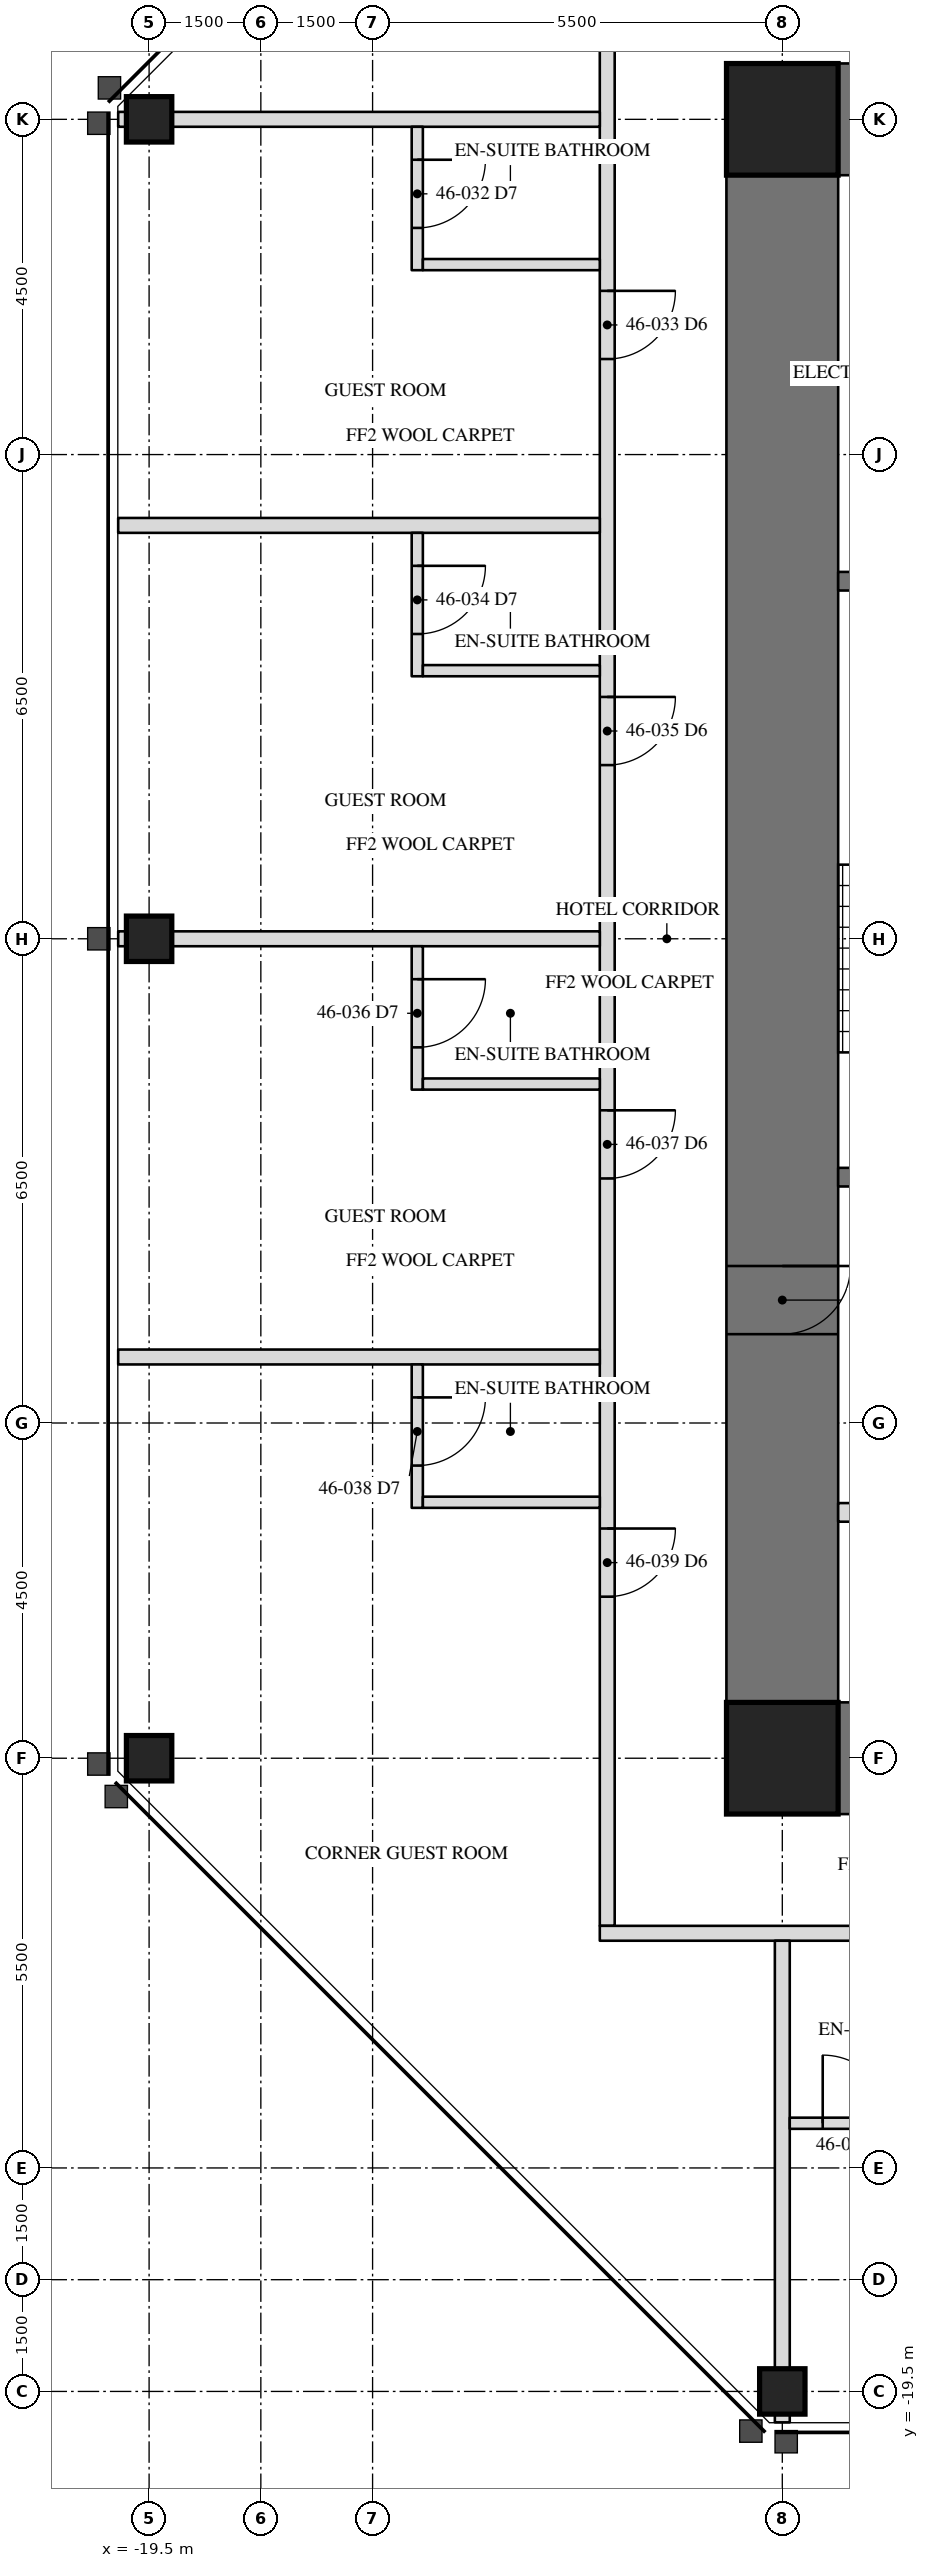
"""IFC4 building model, lengths in metres.
Left out: names, types, materials, properties, quantities, classifications, styles, units other than length and angle.
Written with IfcOpenShell. Run it as: python <this file> out.ifc"""

import sys

from ifc_helpers import new_model, si_unit, direction, frame, frame_2d, origin, origin_2d, place, context, subcontext, project, spatial, rectangle, hollow_rectangle, extrude, element, fill, save


model = new_model("IFC4")
c1 = context("Model", 3, precision=1e-05, world=origin(), true_north=direction((0.0, 1.0)))
c2 = subcontext(c1, "Body", "Model", "MODEL_VIEW")
j1 = project(units=[si_unit("LENGTHUNIT", "METRE"), si_unit("PLANEANGLEUNIT", "RADIAN")], contexts=[c1])
p1 = place(None, origin())
s1 = spatial("IfcSite", under=j1, at=p1, CompositionType="ELEMENT")
p2 = place(p1, origin())
s2 = spatial("IfcBuilding", under=s1, at=p2, CompositionType="ELEMENT")
p3 = place(p2, frame((0.0, 0.0, 197.7)))
s3 = spatial("IfcBuildingStorey", under=s2, at=p3, CompositionType="ELEMENT", Elevation=197.7)
for number, where, z_axis, x_axis in (
    (1, (-19.5, 0.0, 0.0), (0.0, 0.0, 1.0), (0.0, 1.0, 0.0)),
    (2, (-19.5, -11.0, 0.0), (0.0, 0.0, 1.0), (0.0, 1.0, 0.0)),
    (3, (-11.0, -19.5, 0.0), (0.0, 0.0, 1.0), (1.0, 0.0, 0.0)),
    (4, (-19.5, 11.0, 0.0), (0.0, 0.0, 1.0), (0.0, 1.0, 0.0)),
):
    element("IfcColumn", number, at=place(p3, frame(where, z_axis=z_axis, x_axis=x_axis)), inside=s3, PredefinedType="COLUMN", context=c2, shape_type="SweptSolid", body=[
        extrude(hollow_rectangle(XDim=0.61, YDim=0.61, WallThickness=0.076, at=origin_2d()), origin(), (0.0, 0.0, 1.0), 3.5),
    ])
p4 = place(p3, frame((-11.0, 11.0, 0.0), z_axis=(0.0, 0.0, 1.0), x_axis=(0.0, -1.0, 0.0)))
e5 = element("IfcWall", 5, at=p4, inside=s3, PredefinedType="SHEAR", context=c2, shape_type="SweptSolid", body=[
    extrude(rectangle(XDim=22.0, YDim=1.5, at=frame_2d((11.0, 0.0))), origin(), (0.0, 0.0, 1.0), 3.5),
])
p5 = place(p4, frame((15.393, 0.0, 0.0)))
e6 = element("IfcOpeningElement", 6, at=p5, cuts=e5, PredefinedType="OPENING", context=c2, shape_type="SweptSolid", body=[
    extrude(rectangle(XDim=0.915, YDim=2.134, at=frame_2d((0.458, 1.067))), frame((0.0, 0.76, 0.0), z_axis=(0.0, -1.0, 0.0), x_axis=(1.0, 0.0, 0.0)), (0.0, 0.0, 1.0), 1.52),
])
for number, where, z_axis, x_axis in (
    (7, (-6.5, 11.0, 0.0), (0.0, 0.0, 1.0), (-1.0, 0.0, 0.0)),
    (8, (-11.0, -11.0, 0.0), (0.0, 0.0, 1.0), (1.0, 0.0, 0.0)),
):
    element("IfcWall", number, at=place(p3, frame(where, z_axis=z_axis, x_axis=x_axis)), inside=s3, PredefinedType="SHEAR", context=c2, shape_type="SweptSolid", body=[
        extrude(rectangle(XDim=4.5, YDim=1.5, at=frame_2d((2.25, 0.0))), origin(), (0.0, 0.0, 1.0), 3.5),
    ])
for number, where, z_axis, x_axis in (
    (9, (-11.0, 11.0, 0.0), (0.0, 0.0, 1.0), (1.0, 0.0, 0.0)),
    (10, (-11.0, -11.0, 0.0), (0.0, 0.0, 1.0), (1.0, 0.0, 0.0)),
):
    element("IfcColumn", number, at=place(p3, frame(where, z_axis=z_axis, x_axis=x_axis)), inside=s3, PredefinedType="COLUMN", context=c2, shape_type="SweptSolid", body=[
        extrude(hollow_rectangle(XDim=1.499, YDim=1.499, WallThickness=0.102, at=origin_2d()), origin(), (0.0, 0.0, 1.0), 3.5),
    ])
p6 = place(p3, frame((-6.95, 4.8, 0.0), z_axis=(0.0, 0.0, 1.0), x_axis=(-1.0, 0.0, 0.0)))
e11 = element("IfcWall", 11, at=p6, inside=s3, PredefinedType="SOLIDWALL", context=c2, shape_type="SweptSolid", body=[
    extrude(rectangle(XDim=3.3, YDim=0.25, at=frame_2d((1.65, 0.0))), origin(), (0.0, 0.0, 1.0), 3.31),
])
p7 = place(p3, frame((-6.95, -3.2, 0.0), z_axis=(0.0, 0.0, 1.0), x_axis=(-1.0, 0.0, 0.0)))
e12 = element("IfcWall", 12, at=p7, inside=s3, PredefinedType="SOLIDWALL", context=c2, shape_type="SweptSolid", body=[
    extrude(rectangle(XDim=3.3, YDim=0.25, at=frame_2d((1.65, 0.0))), origin(), (0.0, 0.0, 1.0), 3.31),
])
p8 = place(p7, frame((1.116, 0.0, 0.0)))
e13 = element("IfcOpeningElement", 13, at=p8, cuts=e12, PredefinedType="OPENING", context=c2, shape_type="SweptSolid", body=[
    extrude(rectangle(XDim=1.067, YDim=2.134, at=frame_2d((0.533, 1.067))), frame((0.0, 0.135, 0.0), z_axis=(0.0, -1.0, 0.0), x_axis=(1.0, 0.0, 0.0)), (0.0, 0.0, 1.0), 0.27),
])
p9 = place(p3, frame((-6.95, -7.7, 0.0), z_axis=(0.0, 0.0, 1.0), x_axis=(-1.0, 0.0, 0.0)))
e14 = element("IfcWall", 14, at=p9, inside=s3, PredefinedType="PARTITIONING", context=c2, shape_type="SweptSolid", body=[
    extrude(rectangle(XDim=3.3, YDim=0.25, at=frame_2d((1.65, 0.0))), origin(), (0.0, 0.0, 1.0), 3.31),
])
p10 = place(p9, frame((0.45, 0.0, 0.0)))
e15 = element("IfcOpeningElement", 15, at=p10, cuts=e14, PredefinedType="OPENING", context=c2, shape_type="SweptSolid", body=[
    extrude(rectangle(XDim=1.219, YDim=2.134, at=frame_2d((0.609, 1.067))), frame((0.0, 0.135, 0.0), z_axis=(0.0, -1.0, 0.0), x_axis=(1.0, 0.0, 0.0)), (0.0, 0.0, 1.0), 0.27),
])
p11 = place(p3, frame((-13.35, 13.45, 0.0), z_axis=(0.0, 0.0, 1.0), x_axis=(0.0, -1.0, 0.0)))
e16 = element("IfcWall", 16, at=p11, inside=s3, PredefinedType="PARTITIONING", context=c2, shape_type="SweptSolid", body=[
    extrude(rectangle(XDim=26.7, YDim=0.2, at=frame_2d((13.35, 0.0))), origin(), (0.0, 0.0, 1.0), 3.31),
])
p12 = place(p11, frame((4.752, 0.0, 0.0)))
e17 = element("IfcOpeningElement", 17, at=p12, cuts=e16, PredefinedType="OPENING", context=c2, shape_type="SweptSolid", body=[
    extrude(rectangle(XDim=0.915, YDim=2.134, at=frame_2d((0.458, 1.067))), frame((0.0, 0.11, 0.0), z_axis=(0.0, -1.0, 0.0), x_axis=(1.0, 0.0, 0.0)), (0.0, 0.0, 1.0), 0.22),
])
p13 = place(p11, frame((10.204, 0.0, 0.0)))
e18 = element("IfcOpeningElement", 18, at=p13, cuts=e16, PredefinedType="OPENING", context=c2, shape_type="SweptSolid", body=[
    extrude(rectangle(XDim=0.915, YDim=2.134, at=frame_2d((0.458, 1.067))), frame((0.0, 0.11, 0.0), z_axis=(0.0, -1.0, 0.0), x_axis=(1.0, 0.0, 0.0)), (0.0, 0.0, 1.0), 0.22),
])
p14 = place(p11, frame((15.752, 0.0, 0.0)))
e19 = element("IfcOpeningElement", 19, at=p14, cuts=e16, PredefinedType="OPENING", context=c2, shape_type="SweptSolid", body=[
    extrude(rectangle(XDim=0.915, YDim=2.134, at=frame_2d((0.458, 1.067))), frame((0.0, 0.11, 0.0), z_axis=(0.0, -1.0, 0.0), x_axis=(1.0, 0.0, 0.0)), (0.0, 0.0, 1.0), 0.22),
])
p15 = place(p11, frame((21.366, 0.0, 0.0)))
e20 = element("IfcOpeningElement", 20, at=p15, cuts=e16, PredefinedType="OPENING", context=c2, shape_type="SweptSolid", body=[
    extrude(rectangle(XDim=0.915, YDim=2.134, at=frame_2d((0.458, 1.067))), frame((0.0, 0.11, 0.0), z_axis=(0.0, -1.0, 0.0), x_axis=(1.0, 0.0, 0.0)), (0.0, 0.0, 1.0), 0.22),
])
p16 = place(p3, frame((-13.45, -13.35, 0.0), z_axis=(0.0, 0.0, 1.0), x_axis=(1.0, 0.0, 0.0)))
e21 = element("IfcWall", 21, at=p16, inside=s3, PredefinedType="PARTITIONING", context=c2, shape_type="SweptSolid", body=[
    extrude(rectangle(XDim=26.7, YDim=0.2, at=frame_2d((13.35, 0.0))), origin(), (0.0, 0.0, 1.0), 3.31),
])
p17 = place(p16, frame((4.752, 0.0, 0.0)))
e22 = element("IfcOpeningElement", 22, at=p17, cuts=e21, PredefinedType="OPENING", context=c2, shape_type="SweptSolid", body=[
    extrude(rectangle(XDim=0.915, YDim=2.134, at=frame_2d((0.458, 1.067))), frame((0.0, 0.11, 0.0), z_axis=(0.0, -1.0, 0.0), x_axis=(1.0, 0.0, 0.0)), (0.0, 0.0, 1.0), 0.22),
])
p18 = place(p16, frame((10.204, 0.0, 0.0)))
e23 = element("IfcOpeningElement", 23, at=p18, cuts=e21, PredefinedType="OPENING", context=c2, shape_type="SweptSolid", body=[
    extrude(rectangle(XDim=0.915, YDim=2.134, at=frame_2d((0.458, 1.067))), frame((0.0, 0.11, 0.0), z_axis=(0.0, -1.0, 0.0), x_axis=(1.0, 0.0, 0.0)), (0.0, 0.0, 1.0), 0.22),
])
p19 = place(p16, frame((15.752, 0.0, 0.0)))
e24 = element("IfcOpeningElement", 24, at=p19, cuts=e21, PredefinedType="OPENING", context=c2, shape_type="SweptSolid", body=[
    extrude(rectangle(XDim=0.915, YDim=2.134, at=frame_2d((0.458, 1.067))), frame((0.0, 0.11, 0.0), z_axis=(0.0, -1.0, 0.0), x_axis=(1.0, 0.0, 0.0)), (0.0, 0.0, 1.0), 0.22),
])
p20 = place(p16, frame((21.967, 0.0, 0.0)))
e25 = element("IfcOpeningElement", 25, at=p20, cuts=e21, PredefinedType="OPENING", context=c2, shape_type="SweptSolid", body=[
    extrude(rectangle(XDim=0.915, YDim=2.134, at=frame_2d((0.458, 1.067))), frame((0.0, 0.11, 0.0), z_axis=(0.0, -1.0, 0.0), x_axis=(1.0, 0.0, 0.0)), (0.0, 0.0, 1.0), 0.22),
])
p21 = place(p3, frame((-13.45, 11.0, 0.0), z_axis=(0.0, 0.0, 1.0), x_axis=(-1.0, 0.0, 0.0)))
e26 = element("IfcWall", 26, at=p21, inside=s3, PredefinedType="PARTITIONING", context=c2, shape_type="SweptSolid", body=[
    extrude(rectangle(XDim=6.465, YDim=0.2, at=frame_2d((3.232, 0.0))), origin(), (0.0, 0.0, 1.0), 2.802),
])
p22 = place(p3, frame((-13.45, 5.549, 0.0), z_axis=(0.0, 0.0, 1.0), x_axis=(-1.0, 0.0, 0.0)))
e27 = element("IfcWall", 27, at=p22, inside=s3, PredefinedType="PARTITIONING", context=c2, shape_type="SweptSolid", body=[
    extrude(rectangle(XDim=6.465, YDim=0.2, at=frame_2d((3.232, 0.0))), origin(), (0.0, 0.0, 1.0), 3.31),
])
p23 = place(p3, frame((-13.45, 0.0, 0.0), z_axis=(0.0, 0.0, 1.0), x_axis=(-1.0, 0.0, 0.0)))
e28 = element("IfcWall", 28, at=p23, inside=s3, PredefinedType="PARTITIONING", context=c2, shape_type="SweptSolid", body=[
    extrude(rectangle(XDim=6.465, YDim=0.2, at=frame_2d((3.232, 0.0))), origin(), (0.0, 0.0, 1.0), 2.802),
])
p24 = place(p3, frame((-13.45, -5.614, 0.0), z_axis=(0.0, 0.0, 1.0), x_axis=(-1.0, 0.0, 0.0)))
e29 = element("IfcWall", 29, at=p24, inside=s3, PredefinedType="PARTITIONING", context=c2, shape_type="SweptSolid", body=[
    extrude(rectangle(XDim=6.465, YDim=0.2, at=frame_2d((3.232, 0.0))), origin(), (0.0, 0.0, 1.0), 3.31),
])
p25 = place(p3, frame((-15.9, 10.9, 0.0), z_axis=(0.0, 0.0, 1.0), x_axis=(0.0, -1.0, 0.0)))
e30 = element("IfcWall", 30, at=p25, inside=s3, PredefinedType="PARTITIONING", context=c2, shape_type="SweptSolid", body=[
    extrude(rectangle(XDim=1.925, YDim=0.15, at=frame_2d((0.962, 0.0))), origin(), (0.0, 0.0, 1.0), 3.31),
])
p26 = place(p25, frame((0.442, 0.0, 0.0)))
e31 = element("IfcOpeningElement", 31, at=p26, cuts=e30, PredefinedType="OPENING", context=c2, shape_type="SweptSolid", body=[
    extrude(rectangle(XDim=0.915, YDim=2.032, at=frame_2d((0.458, 1.016))), frame((0.0, 0.085, 0.0), z_axis=(0.0, -1.0, 0.0), x_axis=(1.0, 0.0, 0.0)), (0.0, 0.0, 1.0), 0.17),
])
p27 = place(p3, frame((-13.45, 9.05, 0.0), z_axis=(0.0, 0.0, 1.0), x_axis=(-1.0, 0.0, 0.0)))
e32 = element("IfcWall", 32, at=p27, inside=s3, PredefinedType="PARTITIONING", context=c2, shape_type="SweptSolid", body=[
    extrude(rectangle(XDim=2.375, YDim=0.15, at=frame_2d((1.188, 0.0))), origin(), (0.0, 0.0, 1.0), 3.31),
])
p28 = place(p3, frame((-15.9, 5.449, 0.0), z_axis=(0.0, 0.0, 1.0), x_axis=(0.0, -1.0, 0.0)))
e33 = element("IfcWall", 33, at=p28, inside=s3, PredefinedType="PARTITIONING", context=c2, shape_type="SweptSolid", body=[
    extrude(rectangle(XDim=1.925, YDim=0.15, at=frame_2d((0.962, 0.0))), origin(), (0.0, 0.0, 1.0), 3.31),
])
p29 = place(p28, frame((0.442, 0.0, 0.0)))
e34 = element("IfcOpeningElement", 34, at=p29, cuts=e33, PredefinedType="OPENING", context=c2, shape_type="SweptSolid", body=[
    extrude(rectangle(XDim=0.915, YDim=2.032, at=frame_2d((0.458, 1.016))), frame((0.0, 0.085, 0.0), z_axis=(0.0, -1.0, 0.0), x_axis=(1.0, 0.0, 0.0)), (0.0, 0.0, 1.0), 0.17),
])
p30 = place(p3, frame((-13.45, 3.599, 0.0), z_axis=(0.0, 0.0, 1.0), x_axis=(-1.0, 0.0, 0.0)))
e35 = element("IfcWall", 35, at=p30, inside=s3, PredefinedType="PARTITIONING", context=c2, shape_type="SweptSolid", body=[
    extrude(rectangle(XDim=2.375, YDim=0.15, at=frame_2d((1.188, 0.0))), origin(), (0.0, 0.0, 1.0), 2.703),
])
p31 = place(p3, frame((-15.9, -0.1, 0.0), z_axis=(0.0, 0.0, 1.0), x_axis=(0.0, -1.0, 0.0)))
e36 = element("IfcWall", 36, at=p31, inside=s3, PredefinedType="PARTITIONING", context=c2, shape_type="SweptSolid", body=[
    extrude(rectangle(XDim=1.925, YDim=0.15, at=frame_2d((0.962, 0.0))), origin(), (0.0, 0.0, 1.0), 3.31),
])
p32 = place(p31, frame((0.442, 0.0, 0.0)))
e37 = element("IfcOpeningElement", 37, at=p32, cuts=e36, PredefinedType="OPENING", context=c2, shape_type="SweptSolid", body=[
    extrude(rectangle(XDim=0.915, YDim=2.032, at=frame_2d((0.458, 1.016))), frame((0.0, 0.085, 0.0), z_axis=(0.0, -1.0, 0.0), x_axis=(1.0, 0.0, 0.0)), (0.0, 0.0, 1.0), 0.17),
])
p33 = place(p3, frame((-13.45, -1.95, 0.0), z_axis=(0.0, 0.0, 1.0), x_axis=(-1.0, 0.0, 0.0)))
e38 = element("IfcWall", 38, at=p33, inside=s3, PredefinedType="PARTITIONING", context=c2, shape_type="SweptSolid", body=[
    extrude(rectangle(XDim=2.375, YDim=0.15, at=frame_2d((1.188, 0.0))), origin(), (0.0, 0.0, 1.0), 3.31),
])
p34 = place(p3, frame((-15.9, -5.714, 0.0), z_axis=(0.0, 0.0, 1.0), x_axis=(0.0, -1.0, 0.0)))
e39 = element("IfcWall", 39, at=p34, inside=s3, PredefinedType="PARTITIONING", context=c2, shape_type="SweptSolid", body=[
    extrude(rectangle(XDim=1.925, YDim=0.15, at=frame_2d((0.962, 0.0))), origin(), (0.0, 0.0, 1.0), 3.31),
])
p35 = place(p34, frame((0.442, 0.0, 0.0)))
e40 = element("IfcOpeningElement", 40, at=p35, cuts=e39, PredefinedType="OPENING", context=c2, shape_type="SweptSolid", body=[
    extrude(rectangle(XDim=0.915, YDim=2.032, at=frame_2d((0.458, 1.016))), frame((0.0, 0.085, 0.0), z_axis=(0.0, -1.0, 0.0), x_axis=(1.0, 0.0, 0.0)), (0.0, 0.0, 1.0), 0.17),
])
p36 = place(p3, frame((-13.45, -7.564, 0.0), z_axis=(0.0, 0.0, 1.0), x_axis=(-1.0, 0.0, 0.0)))
e41 = element("IfcWall", 41, at=p36, inside=s3, PredefinedType="PARTITIONING", context=c2, shape_type="SweptSolid", body=[
    extrude(rectangle(XDim=2.375, YDim=0.15, at=frame_2d((1.188, 0.0))), origin(), (0.0, 0.0, 1.0), 3.31),
])
p37 = place(p3, frame((-11.0, -13.45, 0.0), z_axis=(0.0, 0.0, 1.0), x_axis=(0.0, -1.0, 0.0)))
e42 = element("IfcWall", 42, at=p37, inside=s3, PredefinedType="PARTITIONING", context=c2, shape_type="SweptSolid", body=[
    extrude(rectangle(XDim=6.465, YDim=0.2, at=frame_2d((3.232, 0.0))), origin(), (0.0, 0.0, 1.0), 2.802),
])
p38 = place(p3, frame((-10.9, -15.9, 0.0), z_axis=(0.0, 0.0, 1.0), x_axis=(1.0, 0.0, 0.0)))
e43 = element("IfcWall", 43, at=p38, inside=s3, PredefinedType="PARTITIONING", context=c2, shape_type="SweptSolid", body=[
    extrude(rectangle(XDim=1.925, YDim=0.15, at=frame_2d((0.962, 0.0))), origin(), (0.0, 0.0, 1.0), 3.31),
])
p39 = place(p38, frame((0.442, 0.0, 0.0)))
e44 = element("IfcOpeningElement", 44, at=p39, cuts=e43, PredefinedType="OPENING", context=c2, shape_type="SweptSolid", body=[
    extrude(rectangle(XDim=0.915, YDim=2.032, at=frame_2d((0.458, 1.016))), frame((0.0, 0.085, 0.0), z_axis=(0.0, -1.0, 0.0), x_axis=(1.0, 0.0, 0.0)), (0.0, 0.0, 1.0), 0.17),
])
p40 = place(p5, origin())
e45 = element("IfcDoor", 45, at=p40, inside=s3, OperationType="SINGLE_SWING_RIGHT", PredefinedType="DOOR", context=c2, shape_type="SweptSolid", body=[
    extrude(rectangle(XDim=0.915, YDim=2.134, at=frame_2d((0.458, 1.067))), frame((0.0, -0.675, 0.0), z_axis=(0.0, -1.0, 0.0), x_axis=(1.0, 0.0, 0.0)), (0.0, 0.0, 1.0), 0.05),
])
fill(e6, e45)
p41 = place(p26, origin())
e46 = element("IfcDoor", 46, at=p41, inside=s3, OperationType="SINGLE_SWING_LEFT", PredefinedType="DOOR", context=c2, shape_type="SweptSolid", body=[
    extrude(rectangle(XDim=0.915, YDim=2.032, at=frame_2d((0.458, 1.016))), frame((0.0, 0.025, 0.0), z_axis=(0.0, -1.0, 0.0), x_axis=(1.0, 0.0, 0.0)), (0.0, 0.0, 1.0), 0.05),
])
fill(e31, e46)
p42 = place(p12, origin())
e47 = element("IfcDoor", 47, at=p42, inside=s3, OperationType="SINGLE_SWING_LEFT", PredefinedType="DOOR", context=c2, shape_type="SweptSolid", body=[
    extrude(rectangle(XDim=0.915, YDim=2.134, at=frame_2d((0.458, 1.067))), frame((0.0, 0.025, 0.0), z_axis=(0.0, -1.0, 0.0), x_axis=(1.0, 0.0, 0.0)), (0.0, 0.0, 1.0), 0.05),
])
fill(e17, e47)
p43 = place(p29, origin())
e48 = element("IfcDoor", 48, at=p43, inside=s3, OperationType="SINGLE_SWING_LEFT", PredefinedType="DOOR", context=c2, shape_type="SweptSolid", body=[
    extrude(rectangle(XDim=0.915, YDim=2.032, at=frame_2d((0.458, 1.016))), frame((0.0, 0.025, 0.0), z_axis=(0.0, -1.0, 0.0), x_axis=(1.0, 0.0, 0.0)), (0.0, 0.0, 1.0), 0.05),
])
fill(e34, e48)
p44 = place(p13, origin())
e49 = element("IfcDoor", 49, at=p44, inside=s3, OperationType="SINGLE_SWING_LEFT", PredefinedType="DOOR", context=c2, shape_type="SweptSolid", body=[
    extrude(rectangle(XDim=0.915, YDim=2.134, at=frame_2d((0.458, 1.067))), frame((0.0, 0.025, 0.0), z_axis=(0.0, -1.0, 0.0), x_axis=(1.0, 0.0, 0.0)), (0.0, 0.0, 1.0), 0.05),
])
fill(e18, e49)
p45 = place(p32, origin())
e50 = element("IfcDoor", 50, at=p45, inside=s3, OperationType="SINGLE_SWING_LEFT", PredefinedType="DOOR", context=c2, shape_type="SweptSolid", body=[
    extrude(rectangle(XDim=0.915, YDim=2.032, at=frame_2d((0.458, 1.016))), frame((0.0, 0.025, 0.0), z_axis=(0.0, -1.0, 0.0), x_axis=(1.0, 0.0, 0.0)), (0.0, 0.0, 1.0), 0.05),
])
fill(e37, e50)
p46 = place(p14, origin())
e51 = element("IfcDoor", 51, at=p46, inside=s3, OperationType="SINGLE_SWING_LEFT", PredefinedType="DOOR", context=c2, shape_type="SweptSolid", body=[
    extrude(rectangle(XDim=0.915, YDim=2.134, at=frame_2d((0.458, 1.067))), frame((0.0, 0.025, 0.0), z_axis=(0.0, -1.0, 0.0), x_axis=(1.0, 0.0, 0.0)), (0.0, 0.0, 1.0), 0.05),
])
fill(e19, e51)
p47 = place(p35, origin())
e52 = element("IfcDoor", 52, at=p47, inside=s3, OperationType="SINGLE_SWING_LEFT", PredefinedType="DOOR", context=c2, shape_type="SweptSolid", body=[
    extrude(rectangle(XDim=0.915, YDim=2.032, at=frame_2d((0.458, 1.016))), frame((0.0, 0.025, 0.0), z_axis=(0.0, -1.0, 0.0), x_axis=(1.0, 0.0, 0.0)), (0.0, 0.0, 1.0), 0.05),
])
fill(e40, e52)
p48 = place(p15, origin())
e53 = element("IfcDoor", 53, at=p48, inside=s3, OperationType="SINGLE_SWING_LEFT", PredefinedType="DOOR", context=c2, shape_type="SweptSolid", body=[
    extrude(rectangle(XDim=0.915, YDim=2.134, at=frame_2d((0.458, 1.067))), frame((0.0, 0.025, 0.0), z_axis=(0.0, -1.0, 0.0), x_axis=(1.0, 0.0, 0.0)), (0.0, 0.0, 1.0), 0.05),
])
fill(e20, e53)
p49 = place(p39, origin())
e54 = element("IfcDoor", 54, at=p49, inside=s3, OperationType="SINGLE_SWING_LEFT", PredefinedType="DOOR", context=c2, shape_type="SweptSolid", body=[
    extrude(rectangle(XDim=0.915, YDim=2.032, at=frame_2d((0.458, 1.016))), frame((0.0, 0.025, 0.0), z_axis=(0.0, -1.0, 0.0), x_axis=(1.0, 0.0, 0.0)), (0.0, 0.0, 1.0), 0.05),
])
fill(e44, e54)
save(model, sys.argv[1])
